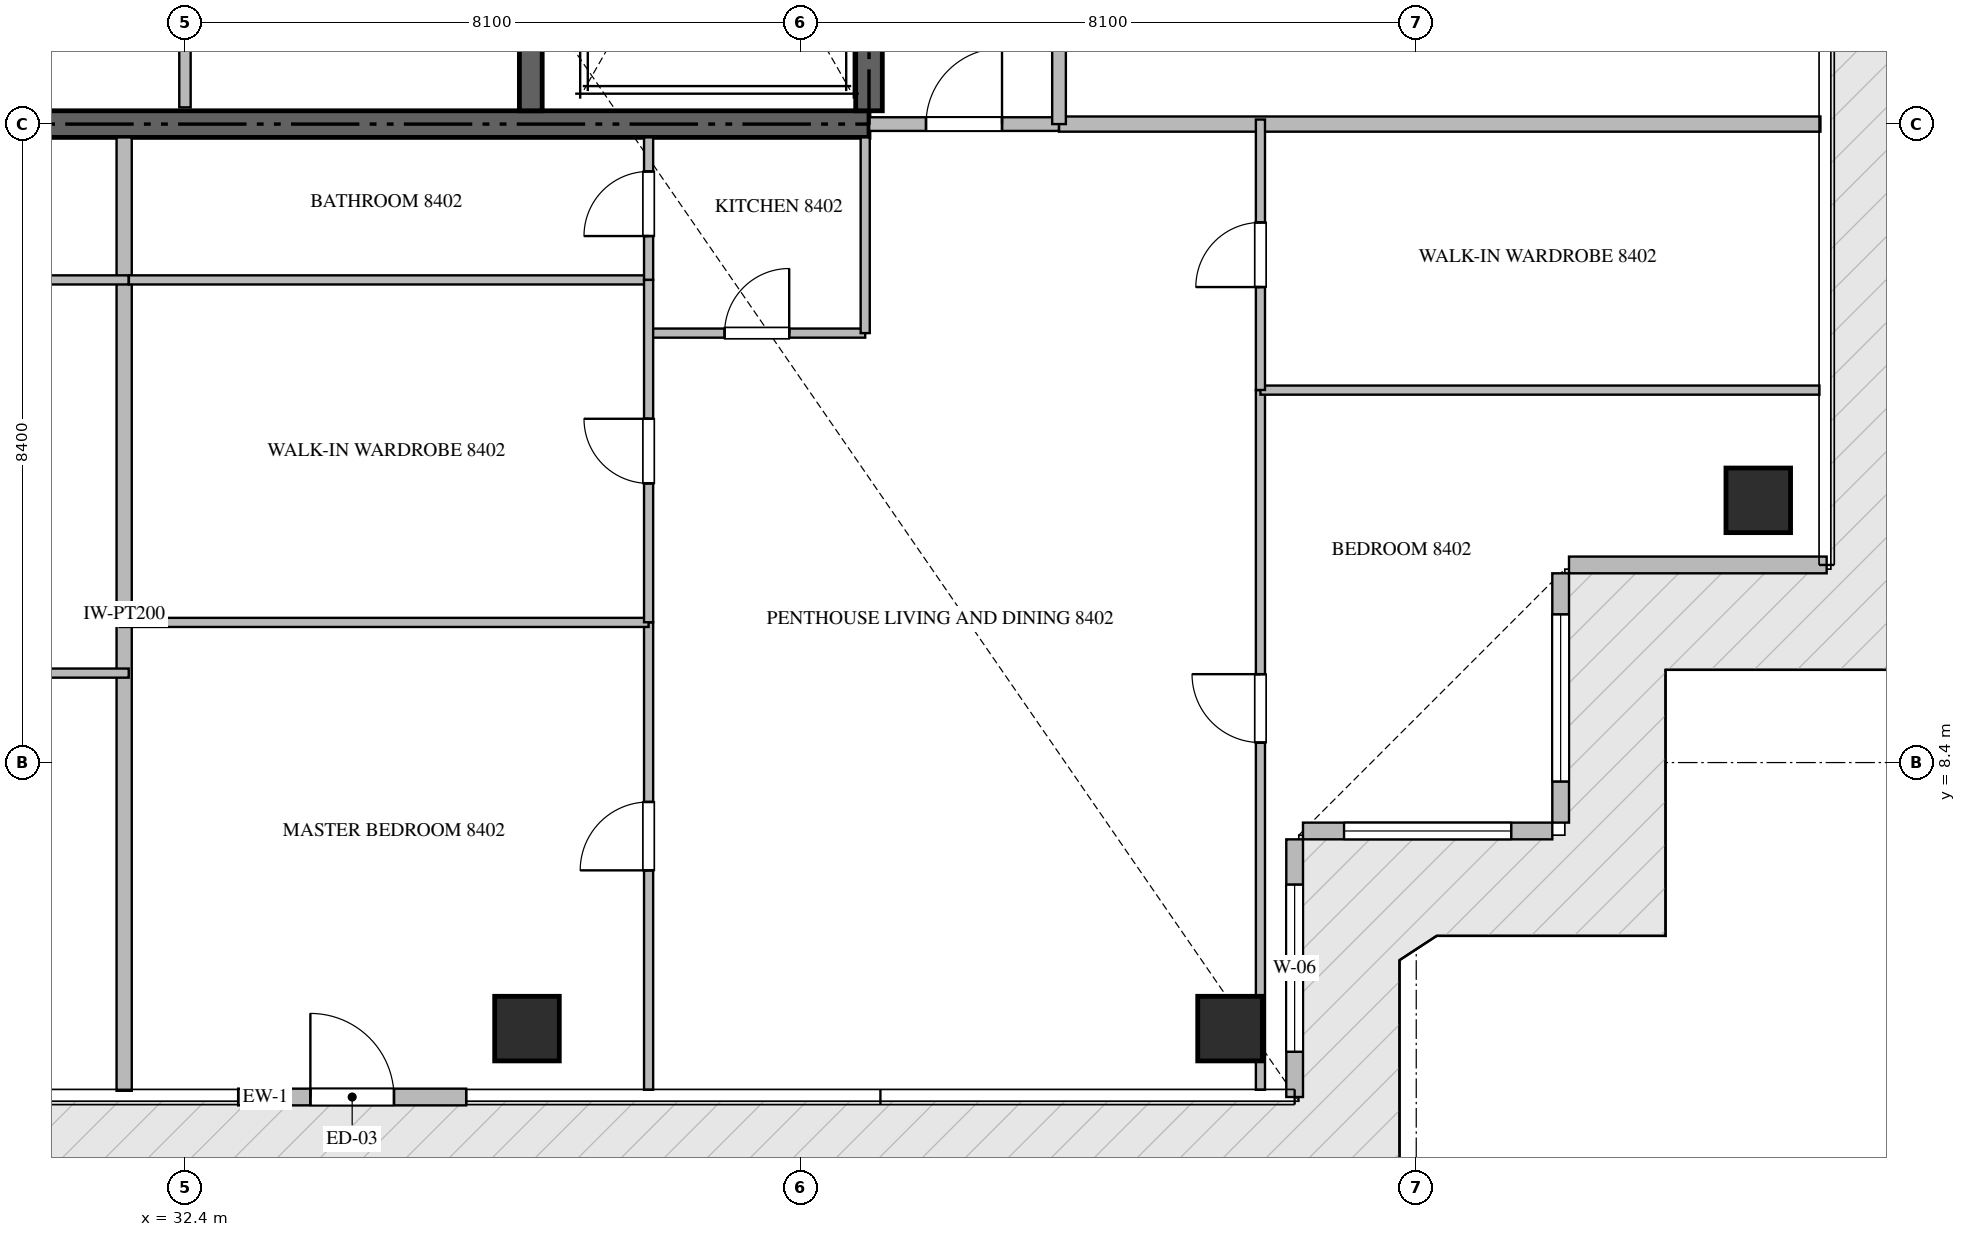
"""IFC4 building model, lengths in metres.
Left out: names, types, materials, properties, quantities, classifications, styles, units other than length and angle.
Written with IfcOpenShell. Run it as: python <this file> out.ifc"""

import sys

from ifc_helpers import new_model, si_unit, direction, frame, frame_2d, origin, origin_2d, place, context, subcontext, project, spatial, rectangle, extrude, source, transform, mapped, element, fill, save


model = new_model("IFC4")
c1 = context("Model", 3, precision=1e-05, world=origin(), true_north=direction((0.0, 1.0)))
c2 = subcontext(c1, "Body", "Model", "MODEL_VIEW")
j1 = project(units=[si_unit("LENGTHUNIT", "METRE"), si_unit("PLANEANGLEUNIT", "RADIAN")], contexts=[c1])
p1 = place(None, origin())
s1 = spatial("IfcSite", under=j1, at=p1, CompositionType="ELEMENT")
p2 = place(p1, origin())
s2 = spatial("IfcBuilding", under=s1, at=p2, CompositionType="ELEMENT")
p3 = place(p2, frame((0.0, 0.0, 338.0)))
s3 = spatial("IfcBuildingStorey", under=s2, at=p3, CompositionType="ELEMENT", Elevation=338.0)
p4 = place(p3, frame((23.4, 16.8, -0.44), z_axis=(0.0, 0.0, 1.0), x_axis=(1.0, 0.0, 0.0)))
e1 = element("IfcWall", 1, at=p4, inside=s3, PredefinedType="SHEAR", context=c2, shape_type="SweptSolid", body=[
    extrude(rectangle(XDim=18.0, YDim=0.35, at=frame_2d((9.0, 0.0))), origin(), (0.0, 0.0, 1.0), 4.228),
])
p5 = place(p3, frame((41.4, 16.975, -0.44), z_axis=(0.0, 0.0, 1.0), x_axis=(0.0, 1.0, 0.0)))
e2 = element("IfcWall", 2, at=p5, inside=s3, PredefinedType="SHEAR", context=c2, shape_type="SweptSolid", body=[
    extrude(rectangle(XDim=8.375, YDim=0.35, at=frame_2d((4.188, 0.0))), origin(), (0.0, 0.0, 1.0), 4.228),
])
p6 = place(p3, frame((36.95, 16.975, -0.44), z_axis=(0.0, 0.0, 1.0), x_axis=(0.0, 1.0, 0.0)))
e3 = element("IfcWall", 3, at=p6, inside=s3, PredefinedType="SHEAR", context=c2, shape_type="SweptSolid", body=[
    extrude(rectangle(XDim=8.375, YDim=0.3, at=frame_2d((4.188, 0.0))), origin(), (0.0, 0.0, 1.0), 4.228),
])
m1 = source(origin(), c2, "Body", "SweptSolid", [
    extrude(rectangle(XDim=0.85, YDim=0.85, at=origin_2d()), origin(), (0.0, 0.0, 1.0), 4.23),
])
for number, where, z_axis, x_axis in (
    (4, (36.9, 4.9, -0.44), (0.0, 0.0, 1.0), (1.0, 0.0, 0.0)),
    (5, (46.15, 4.9, -0.44), (0.0, 0.0, 1.0), (1.0, 0.0, 0.0)),
    (6, (53.1, 11.85, -0.44), (0.0, 0.0, 1.0), (1.0, 0.0, 0.0)),
):
    element("IfcColumn", number, at=place(p3, frame(where, z_axis=z_axis, x_axis=x_axis)), inside=s3, PredefinedType="COLUMN", context=c2, shape_type="MappedRepresentation", body=[
        mapped(m1, transform((0.0, 0.0, 0.0), scale=1.0)),
    ])
p7 = place(p3, frame((33.1, 4.0, 0.0), z_axis=(0.0, 0.0, 1.0), x_axis=(1.0, 0.0, 0.0)))
e7 = element("IfcWall", 7, at=p7, inside=s3, PredefinedType="ELEMENTEDWALL", context=c2, shape_type="SweptSolid", body=[
    extrude(rectangle(XDim=3.0, YDim=0.22, at=frame_2d((1.5, 0.0))), origin(), (0.0, 0.0, 1.0), 3.775),
])
p8 = place(p7, frame((0.95, 0.0, 0.0)))
e8 = element("IfcOpeningElement", 8, at=p8, cuts=e7, PredefinedType="OPENING", context=c2, shape_type="SweptSolid", body=[
    extrude(rectangle(XDim=1.1, YDim=2.2, at=frame_2d((0.55, 1.1))), frame((0.0, 0.12, 0.0), z_axis=(0.0, -1.0, 0.0), x_axis=(1.0, 0.0, 0.0)), (0.0, 0.0, 1.0), 0.24),
])
p9 = place(p3, frame((47.0, 4.0, 0.0), z_axis=(0.0, 0.0, 1.0), x_axis=(0.0, 1.0, 0.0)))
e9 = element("IfcWall", 9, at=p9, inside=s3, PredefinedType="ELEMENTEDWALL", context=c2, shape_type="SweptSolid", body=[
    extrude(rectangle(XDim=3.39, YDim=0.22, at=frame_2d((1.695, 0.0))), origin(), (0.0, 0.0, 1.0), 3.775),
])
p10 = place(p9, frame((0.595, 0.0, 0.65)))
e10 = element("IfcOpeningElement", 10, at=p10, cuts=e9, PredefinedType="OPENING", context=c2, shape_type="SweptSolid", body=[
    extrude(rectangle(XDim=2.2, YDim=2.4, at=frame_2d((1.1, 1.2))), frame((0.0, 0.12, 0.0), z_axis=(0.0, -1.0, 0.0), x_axis=(1.0, 0.0, 0.0)), (0.0, 0.0, 1.0), 0.24),
])
p11 = place(p3, frame((47.11, 7.5, 0.0), z_axis=(0.0, 0.0, 1.0), x_axis=(1.0, 0.0, 0.0)))
e11 = element("IfcWall", 11, at=p11, inside=s3, PredefinedType="ELEMENTEDWALL", context=c2, shape_type="SweptSolid", body=[
    extrude(rectangle(XDim=3.28, YDim=0.22, at=frame_2d((1.64, 0.0))), origin(), (0.0, 0.0, 1.0), 3.775),
])
p12 = place(p11, frame((0.54, 0.0, 0.65)))
e12 = element("IfcOpeningElement", 12, at=p12, cuts=e11, PredefinedType="OPENING", context=c2, shape_type="SweptSolid", body=[
    extrude(rectangle(XDim=2.2, YDim=2.4, at=frame_2d((1.1, 1.2))), frame((0.0, 0.12, 0.0), z_axis=(0.0, -1.0, 0.0), x_axis=(1.0, 0.0, 0.0)), (0.0, 0.0, 1.0), 0.24),
])
p13 = place(p3, frame((50.5, 7.61, 0.0), z_axis=(0.0, 0.0, 1.0), x_axis=(0.0, 1.0, 0.0)))
e13 = element("IfcWall", 13, at=p13, inside=s3, PredefinedType="ELEMENTEDWALL", context=c2, shape_type="SweptSolid", body=[
    extrude(rectangle(XDim=3.28, YDim=0.22, at=frame_2d((1.64, 0.0))), origin(), (0.0, 0.0, 1.0), 3.775),
])
p14 = place(p13, frame((0.54, 0.0, 0.65)))
e14 = element("IfcOpeningElement", 14, at=p14, cuts=e13, PredefinedType="OPENING", context=c2, shape_type="SweptSolid", body=[
    extrude(rectangle(XDim=2.2, YDim=2.4, at=frame_2d((1.1, 1.2))), frame((0.0, 0.12, 0.0), z_axis=(0.0, -1.0, 0.0), x_axis=(1.0, 0.0, 0.0)), (0.0, 0.0, 1.0), 0.24),
])
p15 = place(p3, frame((50.61, 11.0, 0.0), z_axis=(0.0, 0.0, 1.0), x_axis=(1.0, 0.0, 0.0)))
e15 = element("IfcWall", 15, at=p15, inside=s3, PredefinedType="ELEMENTEDWALL", context=c2, shape_type="SweptSolid", body=[
    extrude(rectangle(XDim=3.39, YDim=0.22, at=frame_2d((1.695, 0.0))), origin(), (0.0, 0.0, 1.0), 3.775),
])
p16 = place(p3, frame((32.4, 17.02, 0.0), z_axis=(0.0, 0.0, 1.0), x_axis=(0.0, 1.0, 0.0)))
e16 = element("IfcWall", 16, at=p16, inside=s3, PredefinedType="PARTITIONING", context=c2, shape_type="SweptSolid", body=[
    extrude(rectangle(XDim=2.73, YDim=0.15, at=frame_2d((1.365, 0.0))), origin(), (0.0, 0.0, 1.0), 3.79),
])
p17 = place(p3, frame((31.6, 4.082, 0.0), z_axis=(0.0, 0.0, 1.0), x_axis=(0.0, 1.0, 0.0)))
e17 = element("IfcWall", 17, at=p17, inside=s3, PredefinedType="PARTITIONING", context=c2, shape_type="SweptSolid", body=[
    extrude(rectangle(XDim=12.543, YDim=0.2, at=frame_2d((6.271, 0.0))), origin(), (0.0, 0.0, 1.0), 3.79),
])
p18 = place(p3, frame((43.9, 16.8, 0.0), z_axis=(0.0, 0.0, 1.0), x_axis=(1.0, 0.0, 0.0)))
e18 = element("IfcWall", 18, at=p18, inside=s3, PredefinedType="PARTITIONING", context=c2, shape_type="SweptSolid", body=[
    extrude(rectangle(XDim=10.018, YDim=0.2, at=frame_2d((5.009, 0.0))), origin(), (0.0, 0.0, 1.0), 3.79),
])
p19 = place(p3, frame((41.402, 16.8, 0.0), z_axis=(0.0, 0.0, 1.0), x_axis=(1.0, 0.0, 0.0)))
e19 = element("IfcWall", 19, at=p19, inside=s3, PredefinedType="PARTITIONING", context=c2, shape_type="SweptSolid", body=[
    extrude(rectangle(XDim=2.496, YDim=0.18, at=frame_2d((1.248, 0.0))), origin(), (0.0, 0.0, 1.0), 3.79),
])
p20 = place(p19, frame((0.748, 0.0, 0.0)))
e20 = element("IfcOpeningElement", 20, at=p20, cuts=e19, PredefinedType="OPENING", context=c2, shape_type="SweptSolid", body=[
    extrude(rectangle(XDim=1.0, YDim=2.15, at=frame_2d((0.5, 1.075))), frame((0.0, 0.1, 0.0), z_axis=(0.0, -1.0, 0.0), x_axis=(1.0, 0.0, 0.0)), (0.0, 0.0, 1.0), 0.2),
])
p21 = place(p3, frame((43.9, 16.8, 0.0), z_axis=(0.0, 0.0, 1.0), x_axis=(0.0, 1.0, 0.0)))
e21 = element("IfcWall", 21, at=p21, inside=s3, PredefinedType="PARTITIONING", context=c2, shape_type="SweptSolid", body=[
    extrude(rectangle(XDim=16.8, YDim=0.18, at=frame_2d((8.4, 0.0))), origin(), (0.0, 0.0, 1.0), 3.79),
])
p22 = place(p21, frame((1.3, 0.0, 0.0)))
e22 = element("IfcOpeningElement", 22, at=p22, cuts=e21, PredefinedType="OPENING", context=c2, shape_type="SweptSolid", body=[
    extrude(rectangle(XDim=1.0, YDim=2.15, at=frame_2d((0.5, 1.075))), frame((0.0, 0.1, 0.0), z_axis=(0.0, -1.0, 0.0), x_axis=(1.0, 0.0, 0.0)), (0.0, 0.0, 1.0), 0.2),
])
for number, where, z_axis, x_axis in (
    (23, (26.07, 9.577, 0.0), (0.0, 0.0, 1.0), (1.0, 0.0, 0.0)),
    (24, (26.07, 14.75, 0.0), (0.0, 0.0, 1.0), (1.0, 0.0, 0.0)),
):
    element("IfcWall", number, at=place(p3, frame(where, z_axis=z_axis, x_axis=x_axis)), inside=s3, PredefinedType="PARTITIONING", context=c2, shape_type="SweptSolid", body=[
        extrude(rectangle(XDim=5.59, YDim=0.12, at=frame_2d((2.795, 0.0))), origin(), (0.0, 0.0, 1.0), 3.79),
    ])
p23 = place(p3, frame((38.5, 14.05, 0.0), z_axis=(0.0, 0.0, 1.0), x_axis=(1.0, 0.0, 0.0)))
e25 = element("IfcWall", 25, at=p23, inside=s3, PredefinedType="PARTITIONING", context=c2, shape_type="SweptSolid", body=[
    extrude(rectangle(XDim=2.85, YDim=0.12, at=frame_2d((1.425, 0.0))), origin(), (0.0, 0.0, 1.0), 3.79),
])
p24 = place(p23, frame((1.0, 0.0, 0.0)))
e26 = element("IfcOpeningElement", 26, at=p24, cuts=e25, PredefinedType="OPENING", context=c2, shape_type="SweptSolid", body=[
    extrude(rectangle(XDim=0.85, YDim=2.1, at=frame_2d((0.425, 1.05))), frame((0.0, 0.07, 0.0), z_axis=(0.0, -1.0, 0.0), x_axis=(1.0, 0.0, 0.0)), (0.0, 0.0, 1.0), 0.14),
])
p25 = place(p3, frame((41.35, 14.05, 0.0), z_axis=(0.0, 0.0, 1.0), x_axis=(0.0, 1.0, 0.0)))
e27 = element("IfcWall", 27, at=p25, inside=s3, PredefinedType="PARTITIONING", context=c2, shape_type="SweptSolid", body=[
    extrude(rectangle(XDim=2.575, YDim=0.12, at=frame_2d((1.288, 0.0))), origin(), (0.0, 0.0, 1.0), 3.79),
])
p26 = place(p3, frame((38.5, 4.095, 0.0), z_axis=(0.0, 0.0, 1.0), x_axis=(0.0, 1.0, 0.0)))
e28 = element("IfcWall", 28, at=p26, inside=s3, PredefinedType="PARTITIONING", context=c2, shape_type="SweptSolid", body=[
    extrude(rectangle(XDim=6.149, YDim=0.12, at=frame_2d((3.074, 0.0))), origin(), (0.0, 0.0, 1.0), 3.79),
])
p27 = place(p26, frame((2.887, 0.0, 0.0)))
e29 = element("IfcOpeningElement", 29, at=p27, cuts=e28, PredefinedType="OPENING", context=c2, shape_type="SweptSolid", body=[
    extrude(rectangle(XDim=0.9, YDim=2.1, at=frame_2d((0.45, 1.05))), frame((0.0, 0.07, 0.0), z_axis=(0.0, -1.0, 0.0), x_axis=(1.0, 0.0, 0.0)), (0.0, 0.0, 1.0), 0.14),
])
p28 = place(p3, frame((31.54, 10.244, 0.0), z_axis=(0.0, 0.0, 1.0), x_axis=(1.0, 0.0, 0.0)))
e30 = element("IfcWall", 30, at=p28, inside=s3, PredefinedType="PARTITIONING", context=c2, shape_type="SweptSolid", body=[
    extrude(rectangle(XDim=6.96, YDim=0.12, at=frame_2d((3.48, 0.0))), origin(), (0.0, 0.0, 1.0), 3.79),
])
p29 = place(p3, frame((31.662, 14.75, 0.0), z_axis=(0.0, 0.0, 1.0), x_axis=(1.0, 0.0, 0.0)))
e31 = element("IfcWall", 31, at=p29, inside=s3, PredefinedType="PARTITIONING", context=c2, shape_type="SweptSolid", body=[
    extrude(rectangle(XDim=6.838, YDim=0.12, at=frame_2d((3.419, 0.0))), origin(), (0.0, 0.0, 1.0), 3.79),
])
p30 = place(p3, frame((38.5, 10.246, 0.0), z_axis=(0.0, 0.0, 1.0), x_axis=(0.0, 1.0, 0.0)))
e32 = element("IfcWall", 32, at=p30, inside=s3, PredefinedType="PARTITIONING", context=c2, shape_type="SweptSolid", body=[
    extrude(rectangle(XDim=4.504, YDim=0.12, at=frame_2d((2.252, 0.0))), origin(), (0.0, 0.0, 1.0), 3.79),
])
p31 = place(p30, frame((1.827, 0.0, 0.0)))
e33 = element("IfcOpeningElement", 33, at=p31, cuts=e32, PredefinedType="OPENING", context=c2, shape_type="SweptSolid", body=[
    extrude(rectangle(XDim=0.85, YDim=2.1, at=frame_2d((0.425, 1.05))), frame((0.0, 0.07, 0.0), z_axis=(0.0, -1.0, 0.0), x_axis=(1.0, 0.0, 0.0)), (0.0, 0.0, 1.0), 0.14),
])
p32 = place(p3, frame((38.5, 14.752, 0.0), z_axis=(0.0, 0.0, 1.0), x_axis=(0.0, 1.0, 0.0)))
e34 = element("IfcWall", 34, at=p32, inside=s3, PredefinedType="PARTITIONING", context=c2, shape_type="SweptSolid", body=[
    extrude(rectangle(XDim=1.873, YDim=0.12, at=frame_2d((0.937, 0.0))), origin(), (0.0, 0.0, 1.0), 3.79),
])
p33 = place(p32, frame((0.575, 0.0, 0.0)))
e35 = element("IfcOpeningElement", 35, at=p33, cuts=e34, PredefinedType="OPENING", context=c2, shape_type="SweptSolid", body=[
    extrude(rectangle(XDim=0.85, YDim=2.1, at=frame_2d((0.425, 1.05))), frame((0.0, 0.07, 0.0), z_axis=(0.0, -1.0, 0.0), x_axis=(1.0, 0.0, 0.0)), (0.0, 0.0, 1.0), 0.14),
])
p34 = place(p3, frame((46.55, 4.095, 0.0), z_axis=(0.0, 0.0, 1.0), x_axis=(0.0, 1.0, 0.0)))
e36 = element("IfcWall", 36, at=p34, inside=s3, PredefinedType="PARTITIONING", context=c2, shape_type="SweptSolid", body=[
    extrude(rectangle(XDim=9.205, YDim=0.12, at=frame_2d((4.603, 0.0))), origin(), (0.0, 0.0, 1.0), 3.79),
])
p35 = place(p34, frame((4.568, 0.0, 0.0)))
e37 = element("IfcOpeningElement", 37, at=p35, cuts=e36, PredefinedType="OPENING", context=c2, shape_type="SweptSolid", body=[
    extrude(rectangle(XDim=0.9, YDim=2.1, at=frame_2d((0.45, 1.05))), frame((0.0, 0.07, 0.0), z_axis=(0.0, -1.0, 0.0), x_axis=(1.0, 0.0, 0.0)), (0.0, 0.0, 1.0), 0.14),
])
p36 = place(p3, frame((46.55, 13.3, 0.0), z_axis=(0.0, 0.0, 1.0), x_axis=(1.0, 0.0, 0.0)))
e38 = element("IfcWall", 38, at=p36, inside=s3, PredefinedType="PARTITIONING", context=c2, shape_type="SweptSolid", body=[
    extrude(rectangle(XDim=7.355, YDim=0.12, at=frame_2d((3.677, 0.0))), origin(), (0.0, 0.0, 1.0), 3.79),
])
p37 = place(p3, frame((46.55, 13.302, 0.0), z_axis=(0.0, 0.0, 1.0), x_axis=(0.0, 1.0, 0.0)))
e39 = element("IfcWall", 39, at=p37, inside=s3, PredefinedType="PARTITIONING", context=c2, shape_type="SweptSolid", body=[
    extrude(rectangle(XDim=3.558, YDim=0.12, at=frame_2d((1.779, 0.0))), origin(), (0.0, 0.0, 1.0), 3.79),
])
p38 = place(p37, frame((1.354, 0.0, 0.0)))
e40 = element("IfcOpeningElement", 40, at=p38, cuts=e39, PredefinedType="OPENING", context=c2, shape_type="SweptSolid", body=[
    extrude(rectangle(XDim=0.85, YDim=2.1, at=frame_2d((0.425, 1.05))), frame((0.0, 0.07, 0.0), z_axis=(0.0, -1.0, 0.0), x_axis=(1.0, 0.0, 0.0)), (0.0, 0.0, 1.0), 0.14),
])
m2 = source(origin(), c2, "Body", "SweptSolid", [
    extrude(rectangle(XDim=1.1, YDim=2.2, at=frame_2d((0.55, 1.1))), frame((0.0, 0.025, 0.0), z_axis=(0.0, -1.0, 0.0), x_axis=(1.0, 0.0, 0.0)), (0.0, 0.0, 1.0), 0.05),
])
p39 = place(p8, origin())
e41 = element("IfcDoor", 41, at=p39, inside=s3, OperationType="SINGLE_SWING_LEFT", PredefinedType="DOOR", context=c2, shape_type="MappedRepresentation", body=[
    mapped(m2, transform((0.0, 0.0, 0.0), scale=1.0)),
])
fill(e8, e41)
m3 = source(origin(), c2, "Body", "SweptSolid", [
    extrude(rectangle(XDim=2.2, YDim=2.4, at=frame_2d((1.1, 1.2))), frame((0.0, 0.03, 0.0), z_axis=(0.0, -1.0, 0.0), x_axis=(1.0, 0.0, 0.0)), (0.0, 0.0, 1.0), 0.06),
])
p40 = place(p10, origin())
e42 = element("IfcWindow", 42, at=p40, inside=s3, PartitioningType="SINGLE_PANEL", PredefinedType="WINDOW", context=c2, shape_type="MappedRepresentation", body=[
    mapped(m3, transform((0.0, 0.0, 0.0), scale=1.0)),
])
fill(e10, e42)
p41 = place(p12, origin())
e43 = element("IfcWindow", 43, at=p41, inside=s3, PartitioningType="SINGLE_PANEL", PredefinedType="WINDOW", context=c2, shape_type="MappedRepresentation", body=[
    mapped(m3, transform((0.0, 0.0, 0.0), scale=1.0)),
])
fill(e12, e43)
p42 = place(p14, origin())
e44 = element("IfcWindow", 44, at=p42, inside=s3, PartitioningType="SINGLE_PANEL", PredefinedType="WINDOW", context=c2, shape_type="MappedRepresentation", body=[
    mapped(m3, transform((0.0, 0.0, 0.0), scale=1.0)),
])
fill(e14, e44)
m4 = source(origin(), c2, "Body", "SweptSolid", [
    extrude(rectangle(XDim=1.0, YDim=2.15, at=frame_2d((0.5, 1.075))), frame((0.0, 0.025, 0.0), z_axis=(0.0, -1.0, 0.0), x_axis=(1.0, 0.0, 0.0)), (0.0, 0.0, 1.0), 0.05),
])
p43 = place(p20, origin())
e45 = element("IfcDoor", 45, at=p43, inside=s3, OperationType="SINGLE_SWING_RIGHT", PredefinedType="DOOR", context=c2, shape_type="MappedRepresentation", body=[
    mapped(m4, transform((0.0, 0.0, 0.0), scale=1.0)),
])
fill(e20, e45)
m5 = source(origin(), c2, "Body", "SweptSolid", [
    extrude(rectangle(XDim=0.85, YDim=2.1, at=frame_2d((0.425, 1.05))), frame((0.0, 0.025, 0.0), z_axis=(0.0, -1.0, 0.0), x_axis=(1.0, 0.0, 0.0)), (0.0, 0.0, 1.0), 0.05),
])
p44 = place(p24, origin())
e46 = element("IfcDoor", 46, at=p44, inside=s3, OperationType="SINGLE_SWING_RIGHT", PredefinedType="DOOR", context=c2, shape_type="MappedRepresentation", body=[
    mapped(m5, transform((0.0, 0.0, 0.0), scale=1.0)),
])
fill(e26, e46)
m6 = source(origin(), c2, "Body", "SweptSolid", [
    extrude(rectangle(XDim=0.9, YDim=2.1, at=frame_2d((0.45, 1.05))), frame((0.0, 0.025, 0.0), z_axis=(0.0, -1.0, 0.0), x_axis=(1.0, 0.0, 0.0)), (0.0, 0.0, 1.0), 0.05),
])
p45 = place(p27, origin())
e47 = element("IfcDoor", 47, at=p45, inside=s3, OperationType="SINGLE_SWING_LEFT", PredefinedType="DOOR", context=c2, shape_type="MappedRepresentation", body=[
    mapped(m6, transform((0.0, 0.0, 0.0), scale=1.0)),
])
fill(e29, e47)
p46 = place(p31, origin())
e48 = element("IfcDoor", 48, at=p46, inside=s3, OperationType="SINGLE_SWING_RIGHT", PredefinedType="DOOR", context=c2, shape_type="MappedRepresentation", body=[
    mapped(m5, transform((0.0, 0.0, 0.0), scale=1.0)),
])
fill(e33, e48)
p47 = place(p33, origin())
e49 = element("IfcDoor", 49, at=p47, inside=s3, OperationType="SINGLE_SWING_LEFT", PredefinedType="DOOR", context=c2, shape_type="MappedRepresentation", body=[
    mapped(m5, transform((0.0, 0.0, 0.0), scale=1.0)),
])
fill(e35, e49)
p48 = place(p35, origin())
e50 = element("IfcDoor", 50, at=p48, inside=s3, OperationType="SINGLE_SWING_RIGHT", PredefinedType="DOOR", context=c2, shape_type="MappedRepresentation", body=[
    mapped(m6, transform((0.0, 0.0, 0.0), scale=1.0)),
])
fill(e37, e50)
p49 = place(p38, origin())
e51 = element("IfcDoor", 51, at=p49, inside=s3, OperationType="SINGLE_SWING_LEFT", PredefinedType="DOOR", context=c2, shape_type="MappedRepresentation", body=[
    mapped(m5, transform((0.0, 0.0, 0.0), scale=1.0)),
])
fill(e40, e51)
save(model, sys.argv[1])
